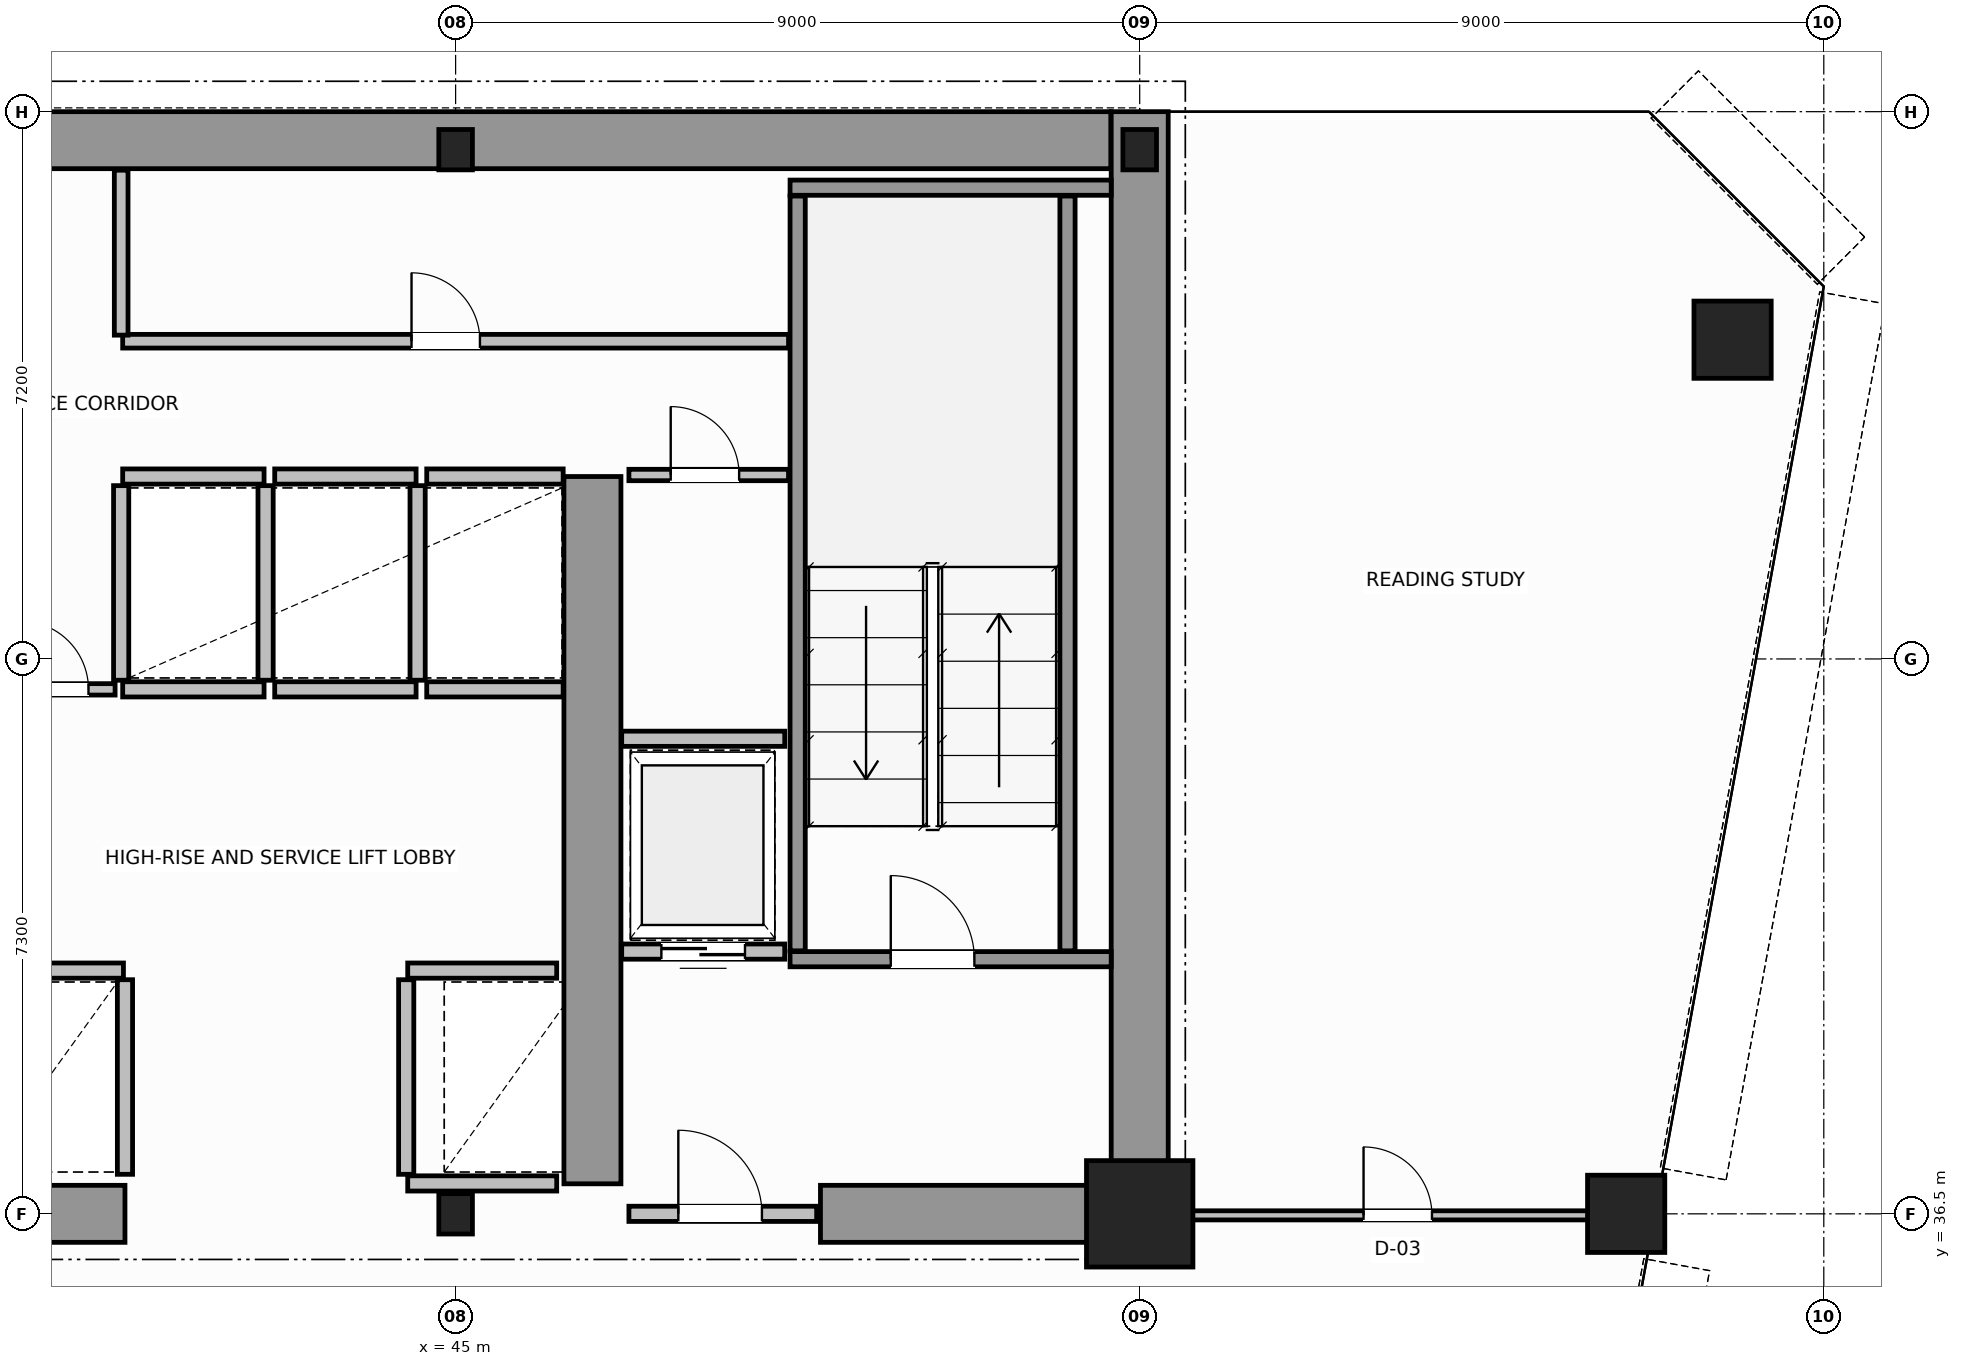
"""IFC4 building model, lengths in metres.
Left out: names, types, materials, properties, quantities, classifications, styles, units other than length and angle.
Written with IfcOpenShell. Run it as: python <this file> out.ifc"""

import sys

from ifc_helpers import new_model, si_unit, direction, frame, frame_2d, origin, origin_2d, place, context, subcontext, project, spatial, rectangle, hollow_circle, i_section, extrude, source, transform, mapped, element, fill, save


model = new_model("IFC4")
c1 = context("Model", 3, precision=1e-05, world=origin(), true_north=direction((0.0, 1.0)))
c2 = subcontext(c1, "Body", "Model", "MODEL_VIEW")
j1 = project(units=[si_unit("LENGTHUNIT", "METRE"), si_unit("PLANEANGLEUNIT", "RADIAN")], contexts=[c1])
p1 = place(None, origin())
s1 = spatial("IfcSite", under=j1, at=p1, CompositionType="ELEMENT")
p2 = place(p1, origin())
s2 = spatial("IfcBuilding", under=s1, at=p2, CompositionType="ELEMENT")
p3 = place(p2, frame((0.0, 0.0, 118.6)))
s3 = spatial("IfcBuildingStorey", under=s2, at=p3, CompositionType="ELEMENT", Elevation=118.6)
m1 = source(origin(), c2, "Body", "SweptSolid", [
    extrude(i_section(OverallWidth=0.442, OverallDepth=0.531, WebThickness=0.065, FlangeThickness=0.076, FilletRadius=0.015, at=origin_2d()), origin(), (0.0, 0.0, 1.0), 3.8),
])
p4 = place(p3, frame((45.0, 36.5, 0.0), z_axis=(0.0, 0.0, 1.0), x_axis=(1.0, 0.0, 0.0)))
e1 = element("IfcColumn", 1, at=p4, inside=s3, PredefinedType="COLUMN", context=c2, shape_type="MappedRepresentation", body=[
    mapped(m1, transform((0.0, 0.0, 0.0), scale=1.0)),
])
m2 = source(origin(), c2, "Body", "SweptSolid", [
    extrude(rectangle(XDim=1.4, YDim=1.4, at=origin_2d()), origin(), (0.0, 0.0, 1.0), 3.8),
])
p5 = place(p3, frame((54.0, 36.5, 0.0), z_axis=(0.0, 0.0, 1.0), x_axis=(1.0, 0.0, 0.0)))
e2 = element("IfcColumn", 2, at=p5, inside=s3, PredefinedType="COLUMN", context=c2, shape_type="MappedRepresentation", body=[
    mapped(m2, transform((0.0, 0.0, 0.0), scale=1.0)),
])
for number, where, z_axis, x_axis in (
    (3, (45.0, 50.5, 0.0), (0.0, 0.0, 1.0), (1.0, 0.0, 0.0)),
    (4, (54.0, 50.5, 0.0), (0.0, 0.0, 1.0), (1.0, 0.0, 0.0)),
):
    element("IfcColumn", number, at=place(p3, frame(where, z_axis=z_axis, x_axis=x_axis)), inside=s3, PredefinedType="COLUMN", context=c2, shape_type="MappedRepresentation", body=[
        mapped(m1, transform((0.0, 0.0, 0.0), scale=1.0)),
    ])
m3 = source(origin(), c2, "Body", "SweptSolid", [
    extrude(hollow_circle(Radius=0.508, WallThickness=0.045, at=origin_2d()), origin(), (0.0, 0.0, 1.0), 3.8),
])
for number, where, z_axis, x_axis in (
    (5, (61.8, 48.0, 0.0), (0.0, 0.0, 1.0), (1.0, 0.0, 0.0)),
    (6, (60.4, 36.5, 0.0), (0.0, 0.0, 1.0), (1.0, 0.0, 0.0)),
):
    element("IfcColumn", number, at=place(p3, frame(where, z_axis=z_axis, x_axis=x_axis)), inside=s3, PredefinedType="COLUMN", context=c2, shape_type="MappedRepresentation", body=[
        mapped(m3, transform((0.0, 0.0, 0.0), scale=1.0)),
    ])
p6 = place(p3, frame((34.002, 50.625, 0.0), z_axis=(0.0, 0.0, 1.0), x_axis=(1.0, 0.0, 0.0)))
e7 = element("IfcWall", 7, at=p6, inside=s3, PredefinedType="SHEAR", context=c2, shape_type="SweptSolid", body=[
    extrude(rectangle(XDim=19.619, YDim=0.75, at=frame_2d((9.81, 0.0))), origin(), (0.0, 0.0, 1.0), 3.8),
])
p7 = place(p3, frame((54.0, 36.5, 0.0), z_axis=(0.0, 0.0, 1.0), x_axis=(0.0, 1.0, 0.0)))
e8 = element("IfcWall", 8, at=p7, inside=s3, PredefinedType="SHEAR", context=c2, shape_type="SweptSolid", body=[
    extrude(rectangle(XDim=14.5, YDim=0.75, at=frame_2d((7.25, 0.0))), origin(), (0.0, 0.0, 1.0), 3.8),
])
p8 = place(p3, frame((36.15, 36.5, 0.0), z_axis=(0.0, 0.0, 1.0), x_axis=(1.0, 0.0, 0.0)))
e9 = element("IfcWall", 9, at=p8, inside=s3, PredefinedType="SHEAR", context=c2, shape_type="SweptSolid", body=[
    extrude(rectangle(XDim=4.5, YDim=0.75, at=frame_2d((2.25, 0.0))), origin(), (0.0, 0.0, 1.0), 3.8),
])
p9 = place(p3, frame((49.8, 36.5, 0.0), z_axis=(0.0, 0.0, 1.0), x_axis=(1.0, 0.0, 0.0)))
e10 = element("IfcWall", 10, at=p9, inside=s3, PredefinedType="SHEAR", context=c2, shape_type="SweptSolid", body=[
    extrude(rectangle(XDim=3.805, YDim=0.75, at=frame_2d((1.902, 0.0))), origin(), (0.0, 0.0, 1.0), 2.38),
])
p10 = place(p3, frame((46.8, 36.895, 0.0), z_axis=(0.0, 0.0, 1.0), x_axis=(0.0, 1.0, 0.0)))
e11 = element("IfcWall", 11, at=p10, inside=s3, PredefinedType="SHEAR", context=c2, shape_type="SweptSolid", body=[
    extrude(rectangle(XDim=9.305, YDim=0.75, at=frame_2d((4.652, 0.0))), origin(), (0.0, 0.0, 1.0), 3.8),
])
p11 = place(p3, frame((49.4, 39.85, 0.0), z_axis=(0.0, 0.0, 1.0), x_axis=(1.0, 0.0, 0.0)))
e12 = element("IfcWall", 12, at=p11, inside=s3, PredefinedType="SOLIDWALL", context=c2, shape_type="SweptSolid", body=[
    extrude(rectangle(XDim=4.225, YDim=0.2, at=frame_2d((2.113, 0.0))), origin(), (0.0, 0.0, 1.0), 3.8),
])
p12 = place(p11, frame((1.325, 0.0, 0.0)))
e13 = element("IfcOpeningElement", 13, at=p12, cuts=e12, PredefinedType="OPENING", context=c2, shape_type="SweptSolid", body=[
    extrude(rectangle(XDim=1.1, YDim=2.15, at=frame_2d((0.55, 1.075))), frame((0.0, 0.11, 0.0), z_axis=(0.0, -1.0, 0.0), x_axis=(1.0, 0.0, 0.0)), (0.0, 0.0, 1.0), 0.22),
])
p13 = place(p3, frame((49.4, 50.0, 0.0), z_axis=(0.0, 0.0, 1.0), x_axis=(1.0, 0.0, 0.0)))
e14 = element("IfcWall", 14, at=p13, inside=s3, PredefinedType="SOLIDWALL", context=c2, shape_type="SweptSolid", body=[
    extrude(rectangle(XDim=4.225, YDim=0.2, at=frame_2d((2.113, 0.0))), origin(), (0.0, 0.0, 1.0), 3.8),
])
for number, where, z_axis, x_axis in (
    (15, (49.5, 39.96, 0.0), (0.0, 0.0, 1.0), (0.0, 1.0, 0.0)),
    (16, (53.05, 39.96, 0.0), (0.0, 0.0, 1.0), (0.0, 1.0, 0.0)),
):
    element("IfcWall", number, at=place(p3, frame(where, z_axis=z_axis, x_axis=x_axis)), inside=s3, PredefinedType="SOLIDWALL", context=c2, shape_type="SweptSolid", body=[
        extrude(rectangle(XDim=9.93, YDim=0.2, at=frame_2d((4.965, 0.0))), origin(), (0.0, 0.0, 1.0), 3.8),
    ])
p14 = place(p3, frame((47.28, 36.5, 0.0), z_axis=(0.0, 0.0, 1.0), x_axis=(1.0, 0.0, 0.0)))
e17 = element("IfcWall", 17, at=p14, inside=s3, PredefinedType="SOLIDWALL", context=c2, shape_type="SweptSolid", body=[
    extrude(rectangle(XDim=2.47, YDim=0.2, at=frame_2d((1.235, 0.0))), origin(), (0.0, 0.0, 1.0), 2.37),
])
p15 = place(p14, frame((0.65, 0.0, 0.0)))
e18 = element("IfcOpeningElement", 18, at=p15, cuts=e17, PredefinedType="OPENING", context=c2, shape_type="SweptSolid", body=[
    extrude(rectangle(XDim=1.1, YDim=2.15, at=frame_2d((0.55, 1.075))), frame((0.0, 0.11, 0.0), z_axis=(0.0, -1.0, 0.0), x_axis=(1.0, 0.0, 0.0)), (0.0, 0.0, 1.0), 0.22),
])
p16 = place(p3, frame((38.785, 39.7, 0.0), z_axis=(0.0, 0.0, 1.0), x_axis=(1.0, 0.0, 0.0)))
e19 = element("IfcWall", 19, at=p16, inside=s3, PredefinedType="SOLIDWALL", context=c2, shape_type="SweptSolid", body=[
    extrude(rectangle(XDim=1.845, YDim=0.2, at=frame_2d((0.922, 0.0))), origin(), (0.0, 0.0, 1.0), 3.58),
])
p17 = place(p3, frame((40.65, 37.02, 0.0), z_axis=(0.0, 0.0, 1.0), x_axis=(0.0, 1.0, 0.0)))
e20 = element("IfcWall", 20, at=p17, inside=s3, PredefinedType="SOLIDWALL", context=c2, shape_type="SweptSolid", body=[
    extrude(rectangle(XDim=2.56, YDim=0.2, at=frame_2d((1.28, 0.0))), origin(), (0.0, 0.0, 1.0), 3.58),
])
p18 = place(p3, frame((44.37, 39.7, 0.0), z_axis=(0.0, 0.0, 1.0), x_axis=(1.0, 0.0, 0.0)))
e21 = element("IfcWall", 21, at=p18, inside=s3, PredefinedType="SOLIDWALL", context=c2, shape_type="SweptSolid", body=[
    extrude(rectangle(XDim=1.96, YDim=0.2, at=frame_2d((0.98, 0.0))), origin(), (0.0, 0.0, 1.0), 3.58),
])
p19 = place(p3, frame((44.37, 36.9, 0.0), z_axis=(0.0, 0.0, 1.0), x_axis=(1.0, 0.0, 0.0)))
e22 = element("IfcWall", 22, at=p19, inside=s3, PredefinedType="SOLIDWALL", context=c2, shape_type="SweptSolid", body=[
    extrude(rectangle(XDim=1.96, YDim=0.2, at=frame_2d((0.98, 0.0))), origin(), (0.0, 0.0, 1.0), 2.37),
])
p20 = place(p3, frame((44.35, 37.02, 0.0), z_axis=(0.0, 0.0, 1.0), x_axis=(0.0, 1.0, 0.0)))
e23 = element("IfcWall", 23, at=p20, inside=s3, PredefinedType="SOLIDWALL", context=c2, shape_type="SweptSolid", body=[
    extrude(rectangle(XDim=2.56, YDim=0.2, at=frame_2d((1.28, 0.0))), origin(), (0.0, 0.0, 1.0), 3.58),
])
for number, where, z_axis, x_axis in (
    (24, (40.62, 43.4, 0.0), (0.0, 0.0, 1.0), (1.0, 0.0, 0.0)),
    (25, (40.62, 46.2, 0.0), (0.0, 0.0, 1.0), (1.0, 0.0, 0.0)),
):
    element("IfcWall", number, at=place(p3, frame(where, z_axis=z_axis, x_axis=x_axis)), inside=s3, PredefinedType="SOLIDWALL", context=c2, shape_type="SweptSolid", body=[
        extrude(rectangle(XDim=1.86, YDim=0.2, at=frame_2d((0.93, 0.0))), origin(), (0.0, 0.0, 1.0), 3.58),
    ])
for number, where, z_axis, x_axis in (
    (26, (40.6, 43.52, 0.0), (0.0, 0.0, 1.0), (0.0, 1.0, 0.0)),
    (27, (42.5, 43.52, 0.0), (0.0, 0.0, 1.0), (0.0, 1.0, 0.0)),
):
    element("IfcWall", number, at=place(p3, frame(where, z_axis=z_axis, x_axis=x_axis)), inside=s3, PredefinedType="SOLIDWALL", context=c2, shape_type="SweptSolid", body=[
        extrude(rectangle(XDim=2.56, YDim=0.2, at=frame_2d((1.28, 0.0))), origin(), (0.0, 0.0, 1.0), 3.58),
    ])
for number, where, z_axis, x_axis in (
    (28, (42.62, 43.4, 0.0), (0.0, 0.0, 1.0), (1.0, 0.0, 0.0)),
    (29, (42.62, 46.2, 0.0), (0.0, 0.0, 1.0), (1.0, 0.0, 0.0)),
):
    element("IfcWall", number, at=place(p3, frame(where, z_axis=z_axis, x_axis=x_axis)), inside=s3, PredefinedType="SOLIDWALL", context=c2, shape_type="SweptSolid", body=[
        extrude(rectangle(XDim=1.86, YDim=0.2, at=frame_2d((0.93, 0.0))), origin(), (0.0, 0.0, 1.0), 3.58),
    ])
p21 = place(p3, frame((44.5, 43.52, 0.0), z_axis=(0.0, 0.0, 1.0), x_axis=(0.0, 1.0, 0.0)))
e30 = element("IfcWall", 30, at=p21, inside=s3, PredefinedType="SOLIDWALL", context=c2, shape_type="SweptSolid", body=[
    extrude(rectangle(XDim=2.56, YDim=0.2, at=frame_2d((1.28, 0.0))), origin(), (0.0, 0.0, 1.0), 3.58),
])
for number, where, z_axis, x_axis in (
    (31, (44.62, 43.4, 0.0), (0.0, 0.0, 1.0), (1.0, 0.0, 0.0)),
    (32, (44.62, 46.2, 0.0), (0.0, 0.0, 1.0), (1.0, 0.0, 0.0)),
):
    element("IfcWall", number, at=place(p3, frame(where, z_axis=z_axis, x_axis=x_axis)), inside=s3, PredefinedType="SOLIDWALL", context=c2, shape_type="SweptSolid", body=[
        extrude(rectangle(XDim=1.795, YDim=0.2, at=frame_2d((0.897, 0.0))), origin(), (0.0, 0.0, 1.0), 3.58),
    ])
p22 = place(p3, frame((47.185, 39.95, 0.0), z_axis=(0.0, 0.0, 1.0), x_axis=(1.0, 0.0, 0.0)))
e33 = element("IfcWall", 33, at=p22, inside=s3, PredefinedType="SOLIDWALL", context=c2, shape_type="SweptSolid", body=[
    extrude(rectangle(XDim=2.145, YDim=0.2, at=frame_2d((1.073, 0.0))), origin(), (0.0, 0.0, 1.0), 3.58),
])
p23 = place(p22, frame((0.522, 0.0, 0.0)))
e34 = element("IfcOpeningElement", 34, at=p23, cuts=e33, PredefinedType="OPENING", context=c2, shape_type="SweptSolid", body=[
    extrude(rectangle(XDim=1.1, YDim=2.15, at=frame_2d((0.55, 1.075))), frame((0.0, 0.11, 0.0), z_axis=(0.0, -1.0, 0.0), x_axis=(1.0, 0.0, 0.0)), (0.0, 0.0, 1.0), 0.22),
])
p24 = place(p3, frame((47.185, 42.75, 0.0), z_axis=(0.0, 0.0, 1.0), x_axis=(1.0, 0.0, 0.0)))
e35 = element("IfcWall", 35, at=p24, inside=s3, PredefinedType="SOLIDWALL", context=c2, shape_type="SweptSolid", body=[
    extrude(rectangle(XDim=2.145, YDim=0.2, at=frame_2d((1.073, 0.0))), origin(), (0.0, 0.0, 1.0), 3.58),
])
p25 = place(p3, frame((47.28, 46.22, 0.0), z_axis=(0.0, 0.0, 1.0), x_axis=(1.0, 0.0, 0.0)))
e36 = element("IfcWall", 36, at=p25, inside=s3, PredefinedType="PARTITIONING", context=c2, shape_type="SweptSolid", body=[
    extrude(rectangle(XDim=2.1, YDim=0.15, at=frame_2d((1.05, 0.0))), origin(), (0.0, 0.0, 1.0), 3.58),
])
p26 = place(p25, frame((0.55, 0.0, 0.0)))
e37 = element("IfcOpeningElement", 37, at=p26, cuts=e36, PredefinedType="OPENING", context=c2, shape_type="SweptSolid", body=[
    extrude(rectangle(XDim=0.9, YDim=2.1, at=frame_2d((0.45, 1.05))), frame((0.0, 0.085, 0.0), z_axis=(0.0, -1.0, 0.0), x_axis=(1.0, 0.0, 0.0)), (0.0, 0.0, 1.0), 0.17),
])
p27 = place(p3, frame((38.92, 43.4, 0.0), z_axis=(0.0, 0.0, 1.0), x_axis=(1.0, 0.0, 0.0)))
e38 = element("IfcWall", 38, at=p27, inside=s3, PredefinedType="PARTITIONING", context=c2, shape_type="SweptSolid", body=[
    extrude(rectangle(XDim=1.6, YDim=0.15, at=frame_2d((0.8, 0.0))), origin(), (0.0, 0.0, 1.0), 3.58),
])
p28 = place(p27, frame((0.35, 0.0, 0.0)))
e39 = element("IfcOpeningElement", 39, at=p28, cuts=e38, PredefinedType="OPENING", context=c2, shape_type="SweptSolid", body=[
    extrude(rectangle(XDim=0.9, YDim=2.1, at=frame_2d((0.45, 1.05))), frame((0.0, 0.085, 0.0), z_axis=(0.0, -1.0, 0.0), x_axis=(1.0, 0.0, 0.0)), (0.0, 0.0, 1.0), 0.17),
])
p29 = place(p3, frame((40.62, 47.98, 0.0), z_axis=(0.0, 0.0, 1.0), x_axis=(1.0, 0.0, 0.0)))
e40 = element("IfcWall", 40, at=p29, inside=s3, PredefinedType="PLUMBINGWALL", context=c2, shape_type="SweptSolid", body=[
    extrude(rectangle(XDim=8.76, YDim=0.18, at=frame_2d((4.38, 0.0))), origin(), (0.0, 0.0, 1.0), 3.58),
])
p30 = place(p29, frame((3.8, 0.0, 0.0)))
e41 = element("IfcOpeningElement", 41, at=p30, cuts=e40, PredefinedType="OPENING", context=c2, shape_type="SweptSolid", body=[
    extrude(rectangle(XDim=0.9, YDim=2.15, at=frame_2d((0.45, 1.075))), frame((0.0, 0.1, 0.0), z_axis=(0.0, -1.0, 0.0), x_axis=(1.0, 0.0, 0.0)), (0.0, 0.0, 1.0), 0.2),
])
p31 = place(p3, frame((40.6, 48.06, 0.0), z_axis=(0.0, 0.0, 1.0), x_axis=(0.0, 1.0, 0.0)))
e42 = element("IfcWall", 42, at=p31, inside=s3, PredefinedType="PLUMBINGWALL", context=c2, shape_type="SweptSolid", body=[
    extrude(rectangle(XDim=2.17, YDim=0.18, at=frame_2d((1.085, 0.0))), origin(), (0.0, 0.0, 1.0), 3.58),
])
p32 = place(p3, frame((54.06, 36.48, 0.0), z_axis=(0.0, 0.0, 1.0), x_axis=(1.0, 0.0, 0.0)))
e43 = element("IfcWall", 43, at=p32, inside=s3, PredefinedType="PARTITIONING", context=c2, shape_type="SweptSolid", body=[
    extrude(rectangle(XDim=6.671, YDim=0.12, at=frame_2d((3.335, 0.0))), origin(), (0.0, 0.0, 1.0), 2.87),
])
p33 = place(p32, frame((2.885, 0.0, 0.0)))
e44 = element("IfcOpeningElement", 44, at=p33, cuts=e43, PredefinedType="OPENING", context=c2, shape_type="SweptSolid", body=[
    extrude(rectangle(XDim=0.9, YDim=2.15, at=frame_2d((0.45, 1.075))), frame((0.0, 0.07, 0.0), z_axis=(0.0, -1.0, 0.0), x_axis=(1.0, 0.0, 0.0)), (0.0, 0.0, 1.0), 0.14),
])
m4 = source(origin(), c2, "Body", "SweptSolid", [
    extrude(rectangle(XDim=1.1, YDim=2.15, at=frame_2d((0.55, 1.075))), frame((0.0, 0.025, 0.0), z_axis=(0.0, -1.0, 0.0), x_axis=(1.0, 0.0, 0.0)), (0.0, 0.0, 1.0), 0.05),
])
p34 = place(p12, origin())
e45 = element("IfcDoor", 45, at=p34, inside=s3, OperationType="SINGLE_SWING_RIGHT", PredefinedType="DOOR", context=c2, shape_type="MappedRepresentation", body=[
    mapped(m4, transform((0.0, 0.0, 0.0), scale=1.0)),
])
fill(e13, e45)
p35 = place(p15, origin())
e46 = element("IfcDoor", 46, at=p35, inside=s3, OperationType="SINGLE_SWING_LEFT", PredefinedType="DOOR", context=c2, shape_type="MappedRepresentation", body=[
    mapped(m4, transform((0.0, 0.0, 0.0), scale=1.0)),
])
fill(e18, e46)
p36 = place(p23, origin())
e47 = element("IfcDoor", 47, at=p36, inside=s3, OperationType="DOUBLE_DOOR_SLIDING", PredefinedType="DOOR", context=c2, shape_type="MappedRepresentation", body=[
    mapped(m4, transform((0.0, 0.0, 0.0), scale=1.0)),
])
fill(e34, e47)
m5 = source(origin(), c2, "Body", "SweptSolid", [
    extrude(rectangle(XDim=0.9, YDim=2.1, at=frame_2d((0.45, 1.05))), frame((0.0, 0.025, 0.0), z_axis=(0.0, -1.0, 0.0), x_axis=(1.0, 0.0, 0.0)), (0.0, 0.0, 1.0), 0.05),
])
p37 = place(p26, origin())
e48 = element("IfcDoor", 48, at=p37, inside=s3, OperationType="SINGLE_SWING_RIGHT", PredefinedType="DOOR", context=c2, shape_type="MappedRepresentation", body=[
    mapped(m5, transform((0.0, 0.0, 0.0), scale=1.0)),
])
fill(e37, e48)
p38 = place(p28, origin())
e49 = element("IfcDoor", 49, at=p38, inside=s3, OperationType="SINGLE_SWING_LEFT", PredefinedType="DOOR", context=c2, shape_type="MappedRepresentation", body=[
    mapped(m5, transform((0.0, 0.0, 0.0), scale=1.0)),
])
fill(e39, e49)
m6 = source(origin(), c2, "Body", "SweptSolid", [
    extrude(rectangle(XDim=0.9, YDim=2.15, at=frame_2d((0.45, 1.075))), frame((0.0, 0.025, 0.0), z_axis=(0.0, -1.0, 0.0), x_axis=(1.0, 0.0, 0.0)), (0.0, 0.0, 1.0), 0.05),
])
p39 = place(p30, origin())
e50 = element("IfcDoor", 50, at=p39, inside=s3, OperationType="SINGLE_SWING_RIGHT", PredefinedType="DOOR", context=c2, shape_type="MappedRepresentation", body=[
    mapped(m6, transform((0.0, 0.0, 0.0), scale=1.0)),
])
fill(e41, e50)
p40 = place(p33, origin())
e51 = element("IfcDoor", 51, at=p40, inside=s3, OperationType="SINGLE_SWING_RIGHT", PredefinedType="DOOR", context=c2, shape_type="MappedRepresentation", body=[
    mapped(m6, transform((0.0, 0.0, 0.0), scale=1.0)),
])
fill(e44, e51)
save(model, sys.argv[1])
